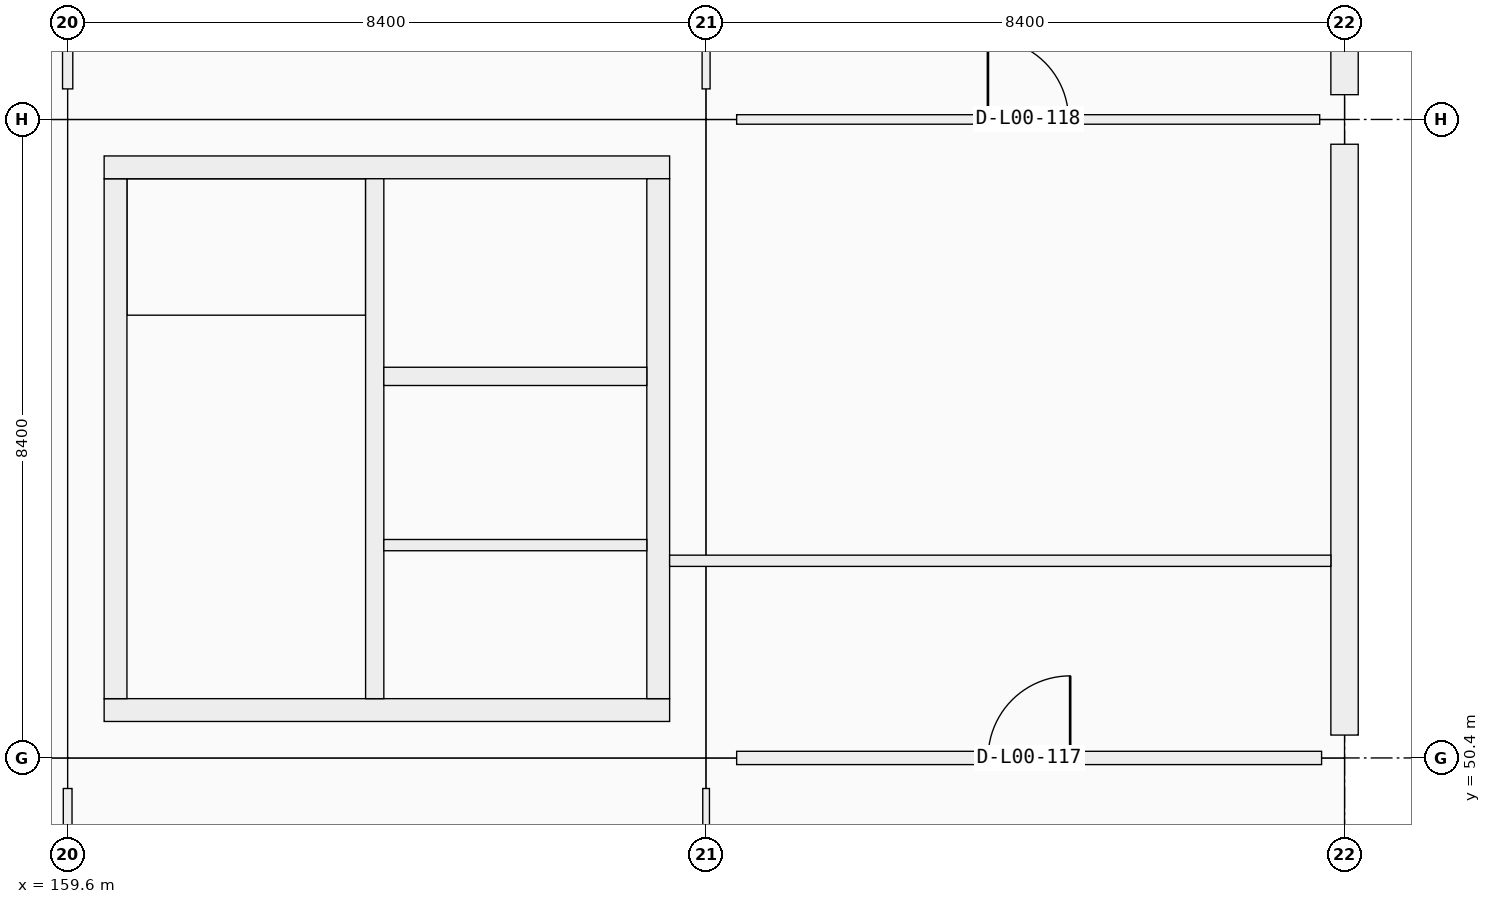
"""IFC4 building model, lengths in metres.
Left out: names, types, materials, properties, quantities, classifications, styles, units other than length and angle.
Written with IfcOpenShell. Run it as: python <this file> out.ifc"""

import sys

from ifc_helpers import new_model, si_unit, direction, frame, frame_2d, origin, origin_2d, place, context, subcontext, project, spatial, rectangle, extrude, element, fill, save


model = new_model("IFC4")
c1 = context("Model", 3, precision=1e-05, world=origin(), true_north=direction((0.0, 1.0)))
c2 = subcontext(c1, "Body", "Model", "MODEL_VIEW")
j1 = project(units=[si_unit("LENGTHUNIT", "METRE"), si_unit("PLANEANGLEUNIT", "RADIAN")], contexts=[c1])
p1 = place(None, origin())
s1 = spatial("IfcSite", under=j1, at=p1, CompositionType="ELEMENT")
p2 = place(p1, origin())
s2 = spatial("IfcBuilding", under=s1, at=p2, CompositionType="ELEMENT")
p3 = place(p2, origin())
s3 = spatial("IfcBuildingStorey", under=s2, at=p3, CompositionType="ELEMENT", Elevation=0.0)
for number, where, z_axis, x_axis in (
    (1, (159.6, 50.4, 0.0), (0.0, 0.0, 1.0), (1.0, 0.0, 0.0)),
    (2, (159.6, 58.8, 0.0), (0.0, 0.0, 1.0), (1.0, 0.0, 0.0)),
    (3, (168.0, 50.4, 0.0), (0.0, 0.0, 1.0), (1.0, 0.0, 0.0)),
    (4, (168.0, 58.8, 0.0), (0.0, 0.0, 1.0), (1.0, 0.0, 0.0)),
):
    element("IfcColumn", number, at=place(p3, frame(where, z_axis=z_axis, x_axis=x_axis)), inside=s3, PredefinedType="COLUMN", context=c2, shape_type="SweptSolid", body=[
        extrude(rectangle(XDim=0.8, YDim=0.8, at=origin_2d()), origin(), (0.0, 0.0, 1.0), 5.76),
    ])
p4 = place(p3, frame((176.4, 50.4, 0.0), z_axis=(0.0, 0.0, 1.0), x_axis=(1.0, 0.0, 0.0)))
e5 = element("IfcColumn", 5, at=p4, inside=s3, PredefinedType="COLUMN", context=c2, shape_type="SweptSolid", body=[
    extrude(rectangle(XDim=0.6, YDim=0.6, at=origin_2d()), origin(), (0.0, 0.0, 1.0), 5.76),
])
p5 = place(p3, frame((176.4, 58.8, 0.0), z_axis=(0.0, 0.0, 1.0), x_axis=(1.0, 0.0, 0.0)))
e6 = element("IfcColumn", 6, at=p5, inside=s3, PredefinedType="COLUMN", context=c2, shape_type="SweptSolid", body=[
    extrude(rectangle(XDim=0.65, YDim=0.65, at=origin_2d()), origin(), (0.0, 0.0, 1.0), 5.76),
])
p6 = place(p3, frame((176.4, 58.474, 0.0), z_axis=(0.0, 0.0, 1.0), x_axis=(0.0, -1.0, 0.0)))
e7 = element("IfcWall", 7, at=p6, inside=s3, PredefinedType="SOLIDWALL", context=c2, shape_type="SweptSolid", body=[
    extrude(rectangle(XDim=7.773, YDim=0.36, at=frame_2d((3.887, 0.0))), origin(), (0.0, 0.0, 1.0), 4.7),
])
p7 = place(p6, frame((2.886, 0.0, 0.0)))
e8 = element("IfcOpeningElement", 8, at=p7, cuts=e7, PredefinedType="OPENING", context=c2, shape_type="SweptSolid", body=[
    extrude(rectangle(XDim=2.0, YDim=2.25, at=frame_2d((1.0, 1.125))), frame((0.0, 0.18, 0.0), z_axis=(0.0, -1.0, 0.0), x_axis=(1.0, 0.0, 0.0)), (0.0, 0.0, 1.0), 0.36),
])
p8 = place(p6, frame((5.624, 0.0, 0.0)))
e9 = element("IfcOpeningElement", 9, at=p8, cuts=e7, PredefinedType="OPENING", context=c2, shape_type="SweptSolid", body=[
    extrude(rectangle(XDim=2.0, YDim=2.25, at=frame_2d((1.0, 1.125))), frame((0.0, 0.18, 0.0), z_axis=(0.0, -1.0, 0.0), x_axis=(1.0, 0.0, 0.0)), (0.0, 0.0, 1.0), 0.36),
])
p9 = place(p3, frame((176.4, 66.899, 0.0), z_axis=(0.0, 0.0, 1.0), x_axis=(0.0, -1.0, 0.0)))
e10 = element("IfcWall", 10, at=p9, inside=s3, PredefinedType="SOLIDWALL", context=c2, shape_type="SweptSolid", body=[
    extrude(rectangle(XDim=7.773, YDim=0.36, at=frame_2d((3.886, 0.0))), origin(), (0.0, 0.0, 1.0), 4.7),
])
p10 = place(p9, frame((3.286, 0.0, 0.9)))
e11 = element("IfcOpeningElement", 11, at=p10, cuts=e10, PredefinedType="OPENING", context=c2, shape_type="SweptSolid", body=[
    extrude(rectangle(XDim=1.2, YDim=2.1, at=frame_2d((0.6, 1.05))), frame((0.0, 0.18, 0.0), z_axis=(0.0, -1.0, 0.0), x_axis=(1.0, 0.0, 0.0)), (0.0, 0.0, 1.0), 0.36),
])
p11 = place(p3, frame((167.52, 51.03, 0.0), z_axis=(0.0, 0.0, 1.0), x_axis=(-1.0, 0.0, 0.0)))
e12 = element("IfcWall", 12, at=p11, inside=s3, PredefinedType="SHEAR", context=c2, shape_type="SweptSolid", body=[
    extrude(rectangle(XDim=7.44, YDim=0.3, at=frame_2d((3.72, 0.0))), origin(), (0.0, 0.0, 1.0), 5.76),
])
p12 = place(p11, frame((1.28, 0.0, 0.0)))
e13 = element("IfcOpeningElement", 13, at=p12, cuts=e12, PredefinedType="OPENING", context=c2, shape_type="SweptSolid", body=[
    extrude(rectangle(XDim=1.5, YDim=2.15, at=frame_2d((0.75, 1.075))), frame((0.0, 0.15, 0.0), z_axis=(0.0, -1.0, 0.0), x_axis=(1.0, 0.0, 0.0)), (0.0, 0.0, 1.0), 0.3),
])
p13 = place(p3, frame((160.23, 51.18, 0.0), z_axis=(0.0, 0.0, 1.0), x_axis=(0.0, 1.0, 0.0)))
e14 = element("IfcWall", 14, at=p13, inside=s3, PredefinedType="SHEAR", context=c2, shape_type="SweptSolid", body=[
    extrude(rectangle(XDim=6.84, YDim=0.3, at=frame_2d((3.42, 0.0))), origin(), (0.0, 0.0, 1.0), 5.76),
])
p14 = place(p3, frame((160.08, 58.17, 0.0), z_axis=(0.0, 0.0, 1.0), x_axis=(1.0, 0.0, 0.0)))
e15 = element("IfcWall", 15, at=p14, inside=s3, PredefinedType="SHEAR", context=c2, shape_type="SweptSolid", body=[
    extrude(rectangle(XDim=7.44, YDim=0.3, at=frame_2d((3.72, 0.0))), origin(), (0.0, 0.0, 1.0), 5.76),
])
p15 = place(p3, frame((167.37, 58.02, 0.0), z_axis=(0.0, 0.0, 1.0), x_axis=(0.0, -1.0, 0.0)))
e16 = element("IfcWall", 16, at=p15, inside=s3, PredefinedType="SHEAR", context=c2, shape_type="SweptSolid", body=[
    extrude(rectangle(XDim=6.84, YDim=0.3, at=frame_2d((3.42, 0.0))), origin(), (0.0, 0.0, 1.0), 5.76),
])
p16 = place(p15, frame((5.12, 0.0, 0.0)))
e17 = element("IfcOpeningElement", 17, at=p16, cuts=e16, PredefinedType="OPENING", context=c2, shape_type="SweptSolid", body=[
    extrude(rectangle(XDim=1.5, YDim=2.15, at=frame_2d((0.75, 1.075))), frame((0.0, 0.15, 0.0), z_axis=(0.0, -1.0, 0.0), x_axis=(1.0, 0.0, 0.0)), (0.0, 0.0, 1.0), 0.3),
])
p17 = place(p3, frame((163.64, 51.18, 0.0), z_axis=(0.0, 0.0, 1.0), x_axis=(0.0, 1.0, 0.0)))
e18 = element("IfcWall", 18, at=p17, inside=s3, PredefinedType="SHEAR", context=c2, shape_type="SweptSolid", body=[
    extrude(rectangle(XDim=6.84, YDim=0.24, at=frame_2d((3.42, 0.0))), origin(), (0.0, 0.0, 1.0), 5.76),
])
p18 = place(p17, frame((0.12, 0.0, 0.0)))
e19 = element("IfcOpeningElement", 19, at=p18, cuts=e18, PredefinedType="OPENING", context=c2, shape_type="SweptSolid", body=[
    extrude(rectangle(XDim=1.0, YDim=2.15, at=frame_2d((0.5, 1.075))), frame((0.0, 0.12, 0.0), z_axis=(0.0, -1.0, 0.0), x_axis=(1.0, 0.0, 0.0)), (0.0, 0.0, 1.0), 0.24),
])
p19 = place(p3, frame((163.76, 55.42, 0.0), z_axis=(0.0, 0.0, 1.0), x_axis=(1.0, 0.0, 0.0)))
e20 = element("IfcWall", 20, at=p19, inside=s3, PredefinedType="SHEAR", context=c2, shape_type="SweptSolid", body=[
    extrude(rectangle(XDim=3.46, YDim=0.24, at=frame_2d((1.73, 0.0))), origin(), (0.0, 0.0, 1.0), 5.76),
])
p20 = place(p19, frame((1.08, 0.0, 0.0)))
e21 = element("IfcOpeningElement", 21, at=p20, cuts=e20, PredefinedType="OPENING", context=c2, shape_type="SweptSolid", body=[
    extrude(rectangle(XDim=1.3, YDim=2.25, at=frame_2d((0.65, 1.125))), frame((0.0, 0.12, 0.0), z_axis=(0.0, -1.0, 0.0), x_axis=(1.0, 0.0, 0.0)), (0.0, 0.0, 1.0), 0.24),
])
p21 = place(p3, frame((167.22, 53.2, 0.0), z_axis=(0.0, 0.0, 1.0), x_axis=(-1.0, 0.0, 0.0)))
e22 = element("IfcWall", 22, at=p21, inside=s3, PredefinedType="PARTITIONING", context=c2, shape_type="SweptSolid", body=[
    extrude(rectangle(XDim=3.46, YDim=0.148, at=frame_2d((1.73, 0.0))), origin(), (0.0, 0.0, 1.0), 5.51),
])
p22 = place(p21, frame((0.98, 0.0, 0.0)))
e23 = element("IfcOpeningElement", 23, at=p22, cuts=e22, PredefinedType="OPENING", context=c2, shape_type="SweptSolid", body=[
    extrude(rectangle(XDim=1.5, YDim=2.15, at=frame_2d((0.75, 1.075))), frame((0.0, 0.074, 0.0), z_axis=(0.0, -1.0, 0.0), x_axis=(1.0, 0.0, 0.0)), (0.0, 0.0, 1.0), 0.148),
])
p23 = place(p3, frame((168.402, 50.4, 0.0), z_axis=(0.0, 0.0, 1.0), x_axis=(1.0, 0.0, 0.0)))
e24 = element("IfcWall", 24, at=p23, inside=s3, PredefinedType="PARTITIONING", context=c2, shape_type="SweptSolid", body=[
    extrude(rectangle(XDim=7.696, YDim=0.175, at=frame_2d((3.848, 0.0))), origin(), (0.0, 0.0, 1.0), 3.66),
])
p24 = place(p23, frame((3.308, 0.0, 0.0)))
e25 = element("IfcOpeningElement", 25, at=p24, cuts=e24, PredefinedType="OPENING", context=c2, shape_type="SweptSolid", body=[
    extrude(rectangle(XDim=1.08, YDim=2.25, at=frame_2d((0.54, 1.125))), frame((0.0, 0.087, 0.0), z_axis=(0.0, -1.0, 0.0), x_axis=(1.0, 0.0, 0.0)), (0.0, 0.0, 1.0), 0.175),
])
p25 = place(p3, frame((168.402, 58.8, 0.0), z_axis=(0.0, 0.0, 1.0), x_axis=(1.0, 0.0, 0.0)))
e26 = element("IfcWall", 26, at=p25, inside=s3, PredefinedType="PARTITIONING", context=c2, shape_type="SweptSolid", body=[
    extrude(rectangle(XDim=7.671, YDim=0.125, at=frame_2d((3.835, 0.0))), origin(), (0.0, 0.0, 1.0), 3.66),
])
p26 = place(p25, frame((3.306, 0.0, 0.0)))
e27 = element("IfcOpeningElement", 27, at=p26, cuts=e26, PredefinedType="OPENING", context=c2, shape_type="SweptSolid", body=[
    extrude(rectangle(XDim=1.06, YDim=2.25, at=frame_2d((0.53, 1.125))), frame((0.0, 0.062, 0.0), z_axis=(0.0, -1.0, 0.0), x_axis=(1.0, 0.0, 0.0)), (0.0, 0.0, 1.0), 0.125),
])
p27 = place(p3, frame((159.6, 42.402, 0.0), z_axis=(0.0, 0.0, 1.0), x_axis=(0.0, 1.0, 0.0)))
e28 = element("IfcWall", 28, at=p27, inside=s3, PredefinedType="PARTITIONING", context=c2, shape_type="SweptSolid", body=[
    extrude(rectangle(XDim=7.596, YDim=0.115, at=frame_2d((3.798, 0.0))), origin(), (0.0, 0.0, 1.0), 3.66),
])
p28 = place(p27, frame((3.338, 0.0, 0.0)))
e29 = element("IfcOpeningElement", 29, at=p28, cuts=e28, PredefinedType="OPENING", context=c2, shape_type="SweptSolid", body=[
    extrude(rectangle(XDim=0.92, YDim=2.15, at=frame_2d((0.46, 1.075))), frame((0.0, 0.058, 0.0), z_axis=(0.0, -1.0, 0.0), x_axis=(1.0, 0.0, 0.0)), (0.0, 0.0, 1.0), 0.115),
])
p29 = place(p3, frame((159.6, 59.202, 0.0), z_axis=(0.0, 0.0, 1.0), x_axis=(0.0, 1.0, 0.0)))
e30 = element("IfcWall", 30, at=p29, inside=s3, PredefinedType="PARTITIONING", context=c2, shape_type="SweptSolid", body=[
    extrude(rectangle(XDim=7.596, YDim=0.135, at=frame_2d((3.798, 0.0))), origin(), (0.0, 0.0, 1.0), 3.66),
])
p30 = place(p29, frame((3.288, 0.0, 0.0)))
e31 = element("IfcOpeningElement", 31, at=p30, cuts=e30, PredefinedType="OPENING", context=c2, shape_type="SweptSolid", body=[
    extrude(rectangle(XDim=1.02, YDim=2.2, at=frame_2d((0.51, 1.1))), frame((0.0, 0.067, 0.0), z_axis=(0.0, -1.0, 0.0), x_axis=(1.0, 0.0, 0.0)), (0.0, 0.0, 1.0), 0.135),
])
p31 = place(p3, frame((168.0, 42.402, 0.0), z_axis=(0.0, 0.0, 1.0), x_axis=(0.0, 1.0, 0.0)))
e32 = element("IfcWall", 32, at=p31, inside=s3, PredefinedType="PARTITIONING", context=c2, shape_type="SweptSolid", body=[
    extrude(rectangle(XDim=7.596, YDim=0.088, at=frame_2d((3.798, 0.0))), origin(), (0.0, 0.0, 1.0), 3.66),
])
p32 = place(p31, frame((3.313, 0.0, 0.0)))
e33 = element("IfcOpeningElement", 33, at=p32, cuts=e32, PredefinedType="OPENING", context=c2, shape_type="SweptSolid", body=[
    extrude(rectangle(XDim=0.97, YDim=2.12, at=frame_2d((0.485, 1.06))), frame((0.0, 0.044, 0.0), z_axis=(0.0, -1.0, 0.0), x_axis=(1.0, 0.0, 0.0)), (0.0, 0.0, 1.0), 0.088),
])
p33 = place(p3, frame((168.0, 59.202, 0.0), z_axis=(0.0, 0.0, 1.0), x_axis=(0.0, 1.0, 0.0)))
e34 = element("IfcWall", 34, at=p33, inside=s3, PredefinedType="PARTITIONING", context=c2, shape_type="SweptSolid", body=[
    extrude(rectangle(XDim=7.596, YDim=0.105, at=frame_2d((3.798, 0.0))), origin(), (0.0, 0.0, 1.0), 3.66),
])
p34 = place(p33, frame((3.258, 0.0, 0.0)))
e35 = element("IfcOpeningElement", 35, at=p34, cuts=e34, PredefinedType="OPENING", context=c2, shape_type="SweptSolid", body=[
    extrude(rectangle(XDim=1.08, YDim=2.25, at=frame_2d((0.54, 1.125))), frame((0.0, 0.052, 0.0), z_axis=(0.0, -1.0, 0.0), x_axis=(1.0, 0.0, 0.0)), (0.0, 0.0, 1.0), 0.105),
])
p35 = place(p3, frame((167.52, 52.994, 0.0), z_axis=(0.0, 0.0, 1.0), x_axis=(1.0, 0.0, 0.0)))
e36 = element("IfcWall", 36, at=p35, inside=s3, PredefinedType="PARTITIONING", context=c2, shape_type="SweptSolid", body=[
    extrude(rectangle(XDim=8.7, YDim=0.148, at=frame_2d((4.35, 0.0))), origin(), (0.0, 0.0, 1.0), 3.66),
])
p36 = place(p7, origin())
e37 = element("IfcDoor", 37, at=p36, inside=s3, OperationType="DOUBLE_DOOR_SINGLE_SWING", PredefinedType="DOOR", context=c2, shape_type="SweptSolid", body=[
    extrude(rectangle(XDim=2.0, YDim=2.25, at=frame_2d((1.0, 1.125))), frame((0.0, 0.025, 0.0), z_axis=(0.0, -1.0, 0.0), x_axis=(1.0, 0.0, 0.0)), (0.0, 0.0, 1.0), 0.05),
])
fill(e8, e37)
p37 = place(p8, origin())
e38 = element("IfcDoor", 38, at=p37, inside=s3, OperationType="DOUBLE_DOOR_SINGLE_SWING", PredefinedType="DOOR", context=c2, shape_type="SweptSolid", body=[
    extrude(rectangle(XDim=2.0, YDim=2.25, at=frame_2d((1.0, 1.125))), frame((0.0, 0.025, 0.0), z_axis=(0.0, -1.0, 0.0), x_axis=(1.0, 0.0, 0.0)), (0.0, 0.0, 1.0), 0.05),
])
fill(e9, e38)
p38 = place(p18, origin())
e39 = element("IfcDoor", 39, at=p38, inside=s3, OperationType="SINGLE_SWING_LEFT", PredefinedType="DOOR", context=c2, shape_type="SweptSolid", body=[
    extrude(rectangle(XDim=1.0, YDim=2.15, at=frame_2d((0.5, 1.075))), frame((0.0, 0.025, 0.0), z_axis=(0.0, -1.0, 0.0), x_axis=(1.0, 0.0, 0.0)), (0.0, 0.0, 1.0), 0.05),
])
fill(e19, e39)
p39 = place(p12, origin())
e40 = element("IfcDoor", 40, at=p39, inside=s3, OperationType="DOUBLE_DOOR_SINGLE_SWING", PredefinedType="DOOR", context=c2, shape_type="SweptSolid", body=[
    extrude(rectangle(XDim=1.5, YDim=2.15, at=frame_2d((0.75, 1.075))), frame((0.0, 0.025, 0.0), z_axis=(0.0, -1.0, 0.0), x_axis=(1.0, 0.0, 0.0)), (0.0, 0.0, 1.0), 0.05),
])
fill(e13, e40)
p40 = place(p16, origin())
e41 = element("IfcDoor", 41, at=p40, inside=s3, OperationType="DOUBLE_DOOR_SINGLE_SWING", PredefinedType="DOOR", context=c2, shape_type="SweptSolid", body=[
    extrude(rectangle(XDim=1.5, YDim=2.15, at=frame_2d((0.75, 1.075))), frame((0.0, 0.025, 0.0), z_axis=(0.0, -1.0, 0.0), x_axis=(1.0, 0.0, 0.0)), (0.0, 0.0, 1.0), 0.05),
])
fill(e17, e41)
p41 = place(p20, origin())
e42 = element("IfcDoor", 42, at=p41, inside=s3, OperationType="DOUBLE_DOOR_SLIDING", PredefinedType="DOOR", context=c2, shape_type="SweptSolid", body=[
    extrude(rectangle(XDim=1.3, YDim=2.25, at=frame_2d((0.65, 1.125))), frame((0.0, 0.025, 0.0), z_axis=(0.0, -1.0, 0.0), x_axis=(1.0, 0.0, 0.0)), (0.0, 0.0, 1.0), 0.05),
])
fill(e21, e42)
p42 = place(p22, origin())
e43 = element("IfcDoor", 43, at=p42, inside=s3, OperationType="DOUBLE_DOOR_SINGLE_SWING", PredefinedType="DOOR", context=c2, shape_type="SweptSolid", body=[
    extrude(rectangle(XDim=1.5, YDim=2.15, at=frame_2d((0.75, 1.075))), frame((0.0, 0.025, 0.0), z_axis=(0.0, -1.0, 0.0), x_axis=(1.0, 0.0, 0.0)), (0.0, 0.0, 1.0), 0.05),
])
fill(e23, e43)
p43 = place(p24, origin())
e44 = element("IfcDoor", 44, at=p43, inside=s3, OperationType="SINGLE_SWING_RIGHT", PredefinedType="DOOR", context=c2, shape_type="SweptSolid", body=[
    extrude(rectangle(XDim=1.08, YDim=2.25, at=frame_2d((0.54, 1.125))), frame((0.0, 0.025, 0.0), z_axis=(0.0, -1.0, 0.0), x_axis=(1.0, 0.0, 0.0)), (0.0, 0.0, 1.0), 0.05),
])
fill(e25, e44)
p44 = place(p26, origin())
e45 = element("IfcDoor", 45, at=p44, inside=s3, OperationType="SINGLE_SWING_LEFT", PredefinedType="DOOR", context=c2, shape_type="SweptSolid", body=[
    extrude(rectangle(XDim=1.06, YDim=2.25, at=frame_2d((0.53, 1.125))), frame((0.0, 0.025, 0.0), z_axis=(0.0, -1.0, 0.0), x_axis=(1.0, 0.0, 0.0)), (0.0, 0.0, 1.0), 0.05),
])
fill(e27, e45)
save(model, sys.argv[1])
